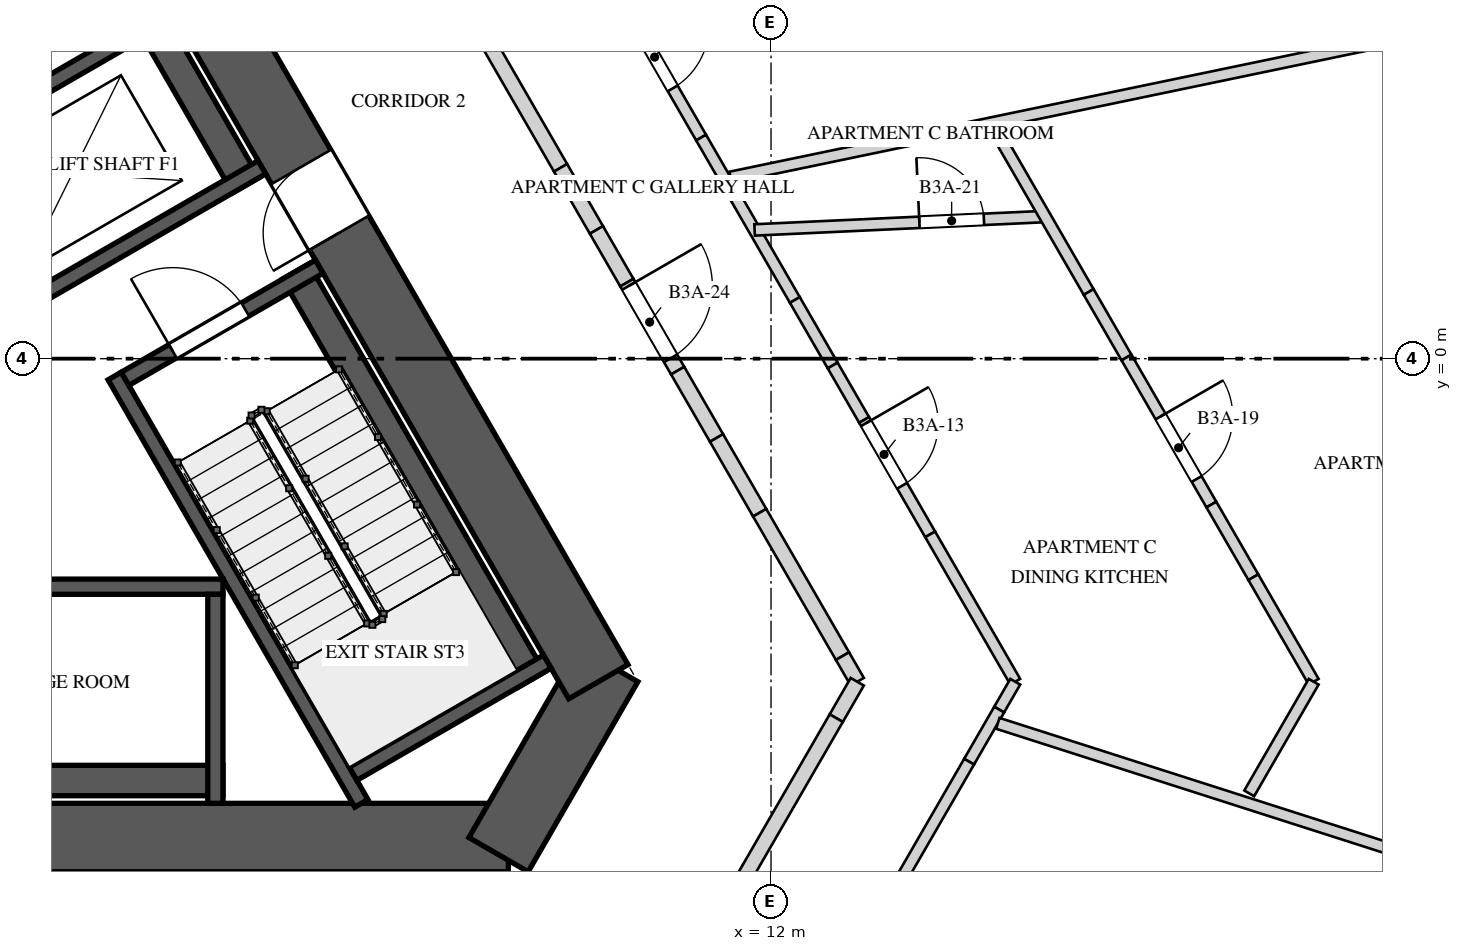
"""IFC4 building model, lengths in metres.
Left out: names, types, materials, properties, quantities, classifications, styles, units other than length and angle.
Written with IfcOpenShell. Run it as: python <this file> out.ifc"""

import sys

from ifc_helpers import new_model, si_unit, direction, frame, frame_2d, origin, place, context, subcontext, project, spatial, polyline, rectangle, outline, extrude, element, fill, save


model = new_model("IFC4")
c1 = context("Model", 3, precision=1e-05, world=origin(), true_north=direction((0.0, 1.0)))
c2 = subcontext(c1, "Body", "Model", "MODEL_VIEW")
j1 = project(units=[si_unit("LENGTHUNIT", "METRE"), si_unit("PLANEANGLEUNIT", "RADIAN")], contexts=[c1])
p1 = place(None, origin())
s1 = spatial("IfcSite", under=j1, at=p1, CompositionType="ELEMENT")
p2 = place(p1, origin())
s2 = spatial("IfcBuilding", under=s1, at=p2, CompositionType="ELEMENT")
p3 = place(p2, frame((0.0, 0.0, 133.6)))
s3 = spatial("IfcBuildingStorey", under=s2, at=p3, CompositionType="ELEMENT", Elevation=133.6)
p4 = place(p3, frame((-8.545, -6.3, 0.0), z_axis=(0.0, 0.0, 1.0), x_axis=(1.0, 0.0, 0.0)))
e1 = element("IfcWall", 1, at=p4, inside=s3, PredefinedType="SHEAR", context=c2, shape_type="SweptSolid", body=[
    extrude(rectangle(XDim=17.09, YDim=0.9, at=frame_2d((8.545, 0.0))), origin(), (0.0, 0.0, 1.0), 4.0),
])
p5 = place(p4, frame((6.75, 0.0, 0.0)))
e2 = element("IfcOpeningElement", 2, at=p5, cuts=e1, PredefinedType="OPENING", context=c2, shape_type="SweptSolid", body=[
    extrude(rectangle(XDim=1.0, YDim=2.4, at=frame_2d((0.5, 1.2))), frame((0.0, 0.46, 0.0), z_axis=(0.0, -1.0, 0.0), x_axis=(1.0, 0.0, 0.0)), (0.0, 0.0, 1.0), 0.92),
])
p6 = place(p3, frame((8.415, -6.525, 0.0), z_axis=(0.0, 0.0, 1.0), x_axis=(0.500059191753, 0.865991226713, 0.0)))
e3 = element("IfcWall", 3, at=p6, inside=s3, PredefinedType="SHEAR", context=c2, shape_type="SweptSolid", body=[
    extrude(rectangle(XDim=2.887, YDim=0.9, at=frame_2d((1.443, 0.0))), origin(), (0.0, 0.0, 1.0), 4.0),
])
p7 = place(p3, frame((9.729, -4.25, 0.0), z_axis=(0.0, 0.0, 1.0), x_axis=(-0.500004814304, 0.866022624227, 0.0)))
e4 = element("IfcWall", 4, at=p7, inside=s3, PredefinedType="SHEAR", context=c2, shape_type="SweptSolid", body=[
    extrude(rectangle(XDim=17.09, YDim=0.9, at=frame_2d((8.545, 0.0))), origin(), (0.0, 0.0, 1.0), 4.0),
])
p8 = place(p7, frame((6.82, 0.0, 0.0)))
e5 = element("IfcOpeningElement", 5, at=p8, cuts=e4, PredefinedType="OPENING", context=c2, shape_type="SweptSolid", body=[
    extrude(rectangle(XDim=1.0, YDim=2.4, at=frame_2d((0.5, 1.2))), frame((0.0, 0.46, 0.0), z_axis=(0.0, -1.0, 0.0), x_axis=(1.0, 0.0, 0.0)), (0.0, 0.0, 1.0), 0.92),
])
p9 = place(p3, frame((8.846, -4.222, 0.0), z_axis=(0.0, 0.0, 1.0), x_axis=(-0.500009909098, 0.866019682689, 0.0)))
e6 = element("IfcWall", 6, at=p9, inside=s3, PredefinedType="SOLIDWALL", context=c2, shape_type="SweptSolid", body=[
    extrude(rectangle(XDim=6.2, YDim=0.4, at=frame_2d((3.1, 0.0))), origin(), (0.0, 0.0, 1.0), 3.65),
])
p10 = place(p3, frame((6.611, -5.85, 0.0), z_axis=(0.0, 0.0, 1.0), x_axis=(-0.499965531574, 0.866045303225, 0.0)))
e7 = element("IfcWall", 7, at=p10, inside=s3, PredefinedType="SOLIDWALL", context=c2, shape_type="SweptSolid", body=[
    extrude(rectangle(XDim=6.492, YDim=0.2, at=frame_2d((3.246, 0.0))), origin(), (0.0, 0.0, 1.0), 3.65),
])
p11 = place(p3, frame((6.501, -5.461, 0.0), z_axis=(0.0, 0.0, 1.0), x_axis=(0.866003658127, 0.500037662692, 0.0)))
e8 = element("IfcWall", 8, at=p11, inside=s3, PredefinedType="SOLIDWALL", context=c2, shape_type="SweptSolid", body=[
    extrude(rectangle(XDim=2.95, YDim=0.2, at=frame_2d((1.475, 0.0))), origin(), (0.0, 0.0, 1.0), 3.65),
])
p12 = place(p3, frame((3.501, -0.265, 0.0), z_axis=(0.0, 0.0, 1.0), x_axis=(0.866039495442, 0.49997559174, 0.0)))
e9 = element("IfcWall", 9, at=p12, inside=s3, PredefinedType="SOLIDWALL", context=c2, shape_type="SweptSolid", body=[
    extrude(rectangle(XDim=2.95, YDim=0.2, at=frame_2d((1.475, 0.0))), origin(), (0.0, 0.0, 1.0), 3.65),
])
p13 = place(p12, frame((0.725, 0.0, 0.0)))
e10 = element("IfcOpeningElement", 10, at=p13, cuts=e9, PredefinedType="OPENING", context=c2, shape_type="SweptSolid", body=[
    extrude(rectangle(XDim=1.1, YDim=2.4, at=frame_2d((0.55, 1.2))), frame((0.0, 0.11, 0.0), z_axis=(0.0, -1.0, 0.0), x_axis=(1.0, 0.0, 0.0)), (0.0, 0.0, 1.0), 0.22),
])
p14 = place(p3, frame((4.79, -3.0, 0.0), z_axis=(0.0, 0.0, 1.0), x_axis=(-1.0, 0.0, 0.0)))
e11 = element("IfcWall", 11, at=p14, inside=s3, PredefinedType="SOLIDWALL", context=c2, shape_type="SweptSolid", body=[
    extrude(rectangle(XDim=5.5, YDim=0.2, at=frame_2d((2.75, 0.0))), origin(), (0.0, 0.0, 1.0), 3.65),
])
p15 = place(p14, frame((2.275, 0.0, 0.0)))
e12 = element("IfcOpeningElement", 12, at=p15, cuts=e11, PredefinedType="OPENING", context=c2, shape_type="SweptSolid", body=[
    extrude(rectangle(XDim=0.95, YDim=2.4, at=frame_2d((0.475, 1.2))), frame((0.0, 0.11, 0.0), z_axis=(0.0, -1.0, 0.0), x_axis=(1.0, 0.0, 0.0)), (0.0, 0.0, 1.0), 0.22),
])
p16 = place(p3, frame((-0.71, -5.55, 0.0), z_axis=(0.0, 0.0, 1.0), x_axis=(1.0, 0.0, 0.0)))
e13 = element("IfcWall", 13, at=p16, inside=s3, PredefinedType="SOLIDWALL", context=c2, shape_type="SweptSolid", body=[
    extrude(rectangle(XDim=5.5, YDim=0.4, at=frame_2d((2.75, 0.0))), origin(), (0.0, 0.0, 1.0), 3.65),
])
p17 = place(p3, frame((4.69, -3.1, 0.0), z_axis=(0.0, 0.0, 1.0), x_axis=(0.0, -1.0, 0.0)))
e14 = element("IfcWall", 14, at=p17, inside=s3, PredefinedType="SOLIDWALL", context=c2, shape_type="SweptSolid", body=[
    extrude(rectangle(XDim=2.75, YDim=0.2, at=frame_2d((1.375, 0.0))), origin(), (0.0, 0.0, 1.0), 3.65),
])
p18 = place(p3, frame((5.092, 2.281, 0.0), z_axis=(0.0, 0.0, 1.0), x_axis=(-0.500018594424, 0.866014668023, 0.0)))
e15 = element("IfcWall", 15, at=p18, inside=s3, PredefinedType="SOLIDWALL", context=c2, shape_type="SweptSolid", body=[
    extrude(rectangle(XDim=4.9, YDim=0.4, at=frame_2d((2.45, 0.0))), origin(), (0.0, 0.0, 1.0), 3.65),
])
for number, where, z_axis, x_axis in (
    (16, (2.227, 0.743, 0.0), (0.0, 0.0, 1.0), (0.866, 0.5, 0.0)),
    (17, (1.052, 2.778, 0.0), (0.0, 0.0, 1.0), (0.866, 0.5, 0.0)),
):
    element("IfcWall", number, at=place(p3, frame(where, z_axis=z_axis, x_axis=x_axis)), inside=s3, PredefinedType="SOLIDWALL", context=c2, shape_type="SweptSolid", body=[
        extrude(rectangle(XDim=3.55, YDim=0.2, at=frame_2d((1.775, 0.0))), origin(), (0.0, 0.0, 1.0), 3.65),
    ])
p19 = place(p3, frame((9.681, 5.331, 0.0), z_axis=(0.0, 0.0, 1.0), x_axis=(0.500034735108, -0.866005348532, 0.0)))
e18 = element("IfcWall", 18, at=p19, inside=s3, PredefinedType="PARTITIONING", context=c2, shape_type="SweptSolid", body=[
    extrude(rectangle(XDim=2.797, YDim=0.15, at=frame_2d((1.398, 0.0))), origin(), (0.0, 0.0, 1.0), 3.65),
])
p20 = place(p19, frame((1.1, 0.0, 0.0)))
e19 = element("IfcOpeningElement", 19, at=p20, cuts=e18, PredefinedType="OPENING", context=c2, shape_type="SweptSolid", body=[
    extrude(rectangle(XDim=0.95, YDim=2.4, at=frame_2d((0.475, 1.2))), frame((0.0, 0.085, 0.0), z_axis=(0.0, -1.0, 0.0), x_axis=(1.0, 0.0, 0.0)), (0.0, 0.0, 1.0), 0.17),
])
p21 = place(p3, frame((11.08, 2.909, 0.0), z_axis=(0.0, 0.0, 1.0), x_axis=(0.500060322201, -0.865990573944, 0.0)))
e20 = element("IfcWall", 20, at=p21, inside=s3, PredefinedType="PARTITIONING", context=c2, shape_type="SweptSolid", body=[
    extrude(rectangle(XDim=0.917, YDim=0.15, at=frame_2d((0.459, 0.0))), origin(), (0.0, 0.0, 1.0), 2.55),
])
p22 = place(p3, frame((11.539, 2.114, 0.0), z_axis=(0.0, 0.0, 1.0), x_axis=(0.499986163319, -0.866033392248, 0.0)))
e21 = element("IfcWall", 21, at=p22, inside=s3, PredefinedType="PARTITIONING", context=c2, shape_type="SweptSolid", body=[
    extrude(rectangle(XDim=1.549, YDim=0.15, at=frame_2d((0.775, 0.0))), origin(), (0.0, 0.0, 1.0), 3.65),
])
p23 = place(p3, frame((12.313, 0.772, 0.0), z_axis=(0.0, 0.0, 1.0), x_axis=(0.499991453095, -0.866030338286, 0.0)))
e22 = element("IfcWall", 22, at=p23, inside=s3, PredefinedType="PARTITIONING", context=c2, shape_type="SweptSolid", body=[
    extrude(rectangle(XDim=0.995, YDim=0.15, at=frame_2d((0.498, 0.0))), origin(), (0.0, 0.0, 1.0), 2.55),
])
p24 = place(p3, frame((12.811, -0.089, 0.0), z_axis=(0.0, 0.0, 1.0), x_axis=(0.500012022864, -0.866018462269, 0.0)))
e23 = element("IfcWall", 23, at=p24, inside=s3, PredefinedType="PARTITIONING", context=c2, shape_type="SweptSolid", body=[
    extrude(rectangle(XDim=0.827, YDim=0.15, at=frame_2d((0.414, 0.0))), origin(), (0.0, 0.0, 1.0), 3.65),
])
p25 = place(p3, frame((13.225, -0.806, 0.0), z_axis=(0.0, 0.0, 1.0), x_axis=(0.500006134913, -0.866021861762, 0.0)))
e24 = element("IfcWall", 24, at=p25, inside=s3, PredefinedType="PARTITIONING", context=c2, shape_type="SweptSolid", body=[
    extrude(outline(polyline([(0.0, 0.0), (1.738, 0.0), (1.738, 2.55), (0.635, 2.55), (0.635, 3.65), (0.0, 3.65), (0.0, 0.0)])), frame((0.0, 0.075, 0.0), z_axis=(0.0, -1.0, 0.0), x_axis=(1.0, 0.0, 0.0)), (0.0, 0.0, 1.0), 0.15),
])
p26 = place(p25, frame((0.05, 0.0, 0.0)))
e25 = element("IfcOpeningElement", 25, at=p26, cuts=e24, PredefinedType="OPENING", context=c2, shape_type="SweptSolid", body=[
    extrude(rectangle(XDim=0.95, YDim=2.4, at=frame_2d((0.475, 1.2))), frame((0.0, 0.085, 0.0), z_axis=(0.0, -1.0, 0.0), x_axis=(1.0, 0.0, 0.0)), (0.0, 0.0, 1.0), 0.17),
])
p27 = place(p3, frame((14.094, -2.311, 0.0), z_axis=(0.0, 0.0, 1.0), x_axis=(0.499974169222, -0.866040316677, 0.0)))
e26 = element("IfcWall", 26, at=p27, inside=s3, PredefinedType="PARTITIONING", context=c2, shape_type="SweptSolid", body=[
    extrude(rectangle(XDim=2.239, YDim=0.15, at=frame_2d((1.119, 0.0))), origin(), (0.0, 0.0, 1.0), 3.65),
])
p28 = place(p3, frame((11.468, 2.386, 0.0), z_axis=(0.0, 0.0, 1.0), x_axis=(0.979030724859, 0.203712640211, 0.0)))
e27 = element("IfcWall", 27, at=p28, inside=s3, PredefinedType="PARTITIONING", context=c2, shape_type="SweptSolid", body=[
    extrude(rectangle(XDim=11.864, YDim=0.15, at=frame_2d((5.932, 0.0))), origin(), (0.0, 0.0, 1.0), 2.55),
])
p29 = place(p3, frame((11.784, 1.694, 0.0), z_axis=(0.0, 0.0, 1.0), x_axis=(0.998933757579, 0.046166524337, 0.0)))
e28 = element("IfcWall", 28, at=p29, inside=s3, PredefinedType="PARTITIONING", context=c2, shape_type="SweptSolid", body=[
    extrude(rectangle(XDim=3.823, YDim=0.15, at=frame_2d((1.912, 0.0))), origin(), (0.0, 0.0, 1.0), 3.65),
])
p30 = place(p29, frame((2.17, 0.0, 0.0)))
e29 = element("IfcOpeningElement", 29, at=p30, cuts=e28, PredefinedType="OPENING", context=c2, shape_type="SweptSolid", body=[
    extrude(rectangle(XDim=0.85, YDim=2.4, at=frame_2d((0.425, 1.2))), frame((0.0, 0.085, 0.0), z_axis=(0.0, -1.0, 0.0), x_axis=(1.0, 0.0, 0.0)), (0.0, 0.0, 1.0), 0.17),
])
p31 = place(p3, frame((14.936, 3.031, 0.0), z_axis=(0.0, 0.0, 1.0), x_axis=(0.499298623879, -0.866429964967, 0.0)))
e30 = element("IfcWall", 30, at=p31, inside=s3, PredefinedType="PARTITIONING", context=c2, shape_type="SweptSolid", body=[
    extrude(rectangle(XDim=0.166, YDim=0.15, at=frame_2d((0.083, 0.0))), origin(), (0.0, 0.0, 1.0), 2.55),
])
p32 = place(p3, frame((15.019, 2.887, 0.0), z_axis=(0.0, 0.0, 1.0), x_axis=(0.50006548692, -0.865987591592, 0.0)))
e31 = element("IfcWall", 31, at=p32, inside=s3, PredefinedType="PARTITIONING", context=c2, shape_type="SweptSolid", body=[
    extrude(rectangle(XDim=2.321, YDim=0.15, at=frame_2d((1.16, 0.0))), origin(), (0.0, 0.0, 1.0), 3.65),
])
p33 = place(p3, frame((16.179, 0.877, 0.0), z_axis=(0.0, 0.0, 1.0), x_axis=(0.499991453095, -0.866030338286, 0.0)))
e32 = element("IfcWall", 32, at=p33, inside=s3, PredefinedType="PARTITIONING", context=c2, shape_type="SweptSolid", body=[
    extrude(rectangle(XDim=0.995, YDim=0.15, at=frame_2d((0.498, 0.0))), origin(), (0.0, 0.0, 1.0), 2.55),
])
p34 = place(p3, frame((16.677, 0.016, 0.0), z_axis=(0.0, 0.0, 1.0), x_axis=(0.499958946799, -0.866049104564, 0.0)))
e33 = element("IfcWall", 33, at=p34, inside=s3, PredefinedType="PARTITIONING", context=c2, shape_type="SweptSolid", body=[
    extrude(rectangle(XDim=2.234, YDim=0.15, at=frame_2d((1.117, 0.0))), origin(), (0.0, 0.0, 1.0), 3.65),
])
p35 = place(p34, frame((0.896, 0.0, 0.0)))
e34 = element("IfcOpeningElement", 34, at=p35, cuts=e33, PredefinedType="OPENING", context=c2, shape_type="SweptSolid", body=[
    extrude(rectangle(XDim=0.95, YDim=2.4, at=frame_2d((0.475, 1.2))), frame((0.0, 0.085, 0.0), z_axis=(0.0, -1.0, 0.0), x_axis=(1.0, 0.0, 0.0)), (0.0, 0.0, 1.0), 0.17),
])
p36 = place(p3, frame((17.793, -1.919, 0.0), z_axis=(0.0, 0.0, 1.0), x_axis=(0.500111757231, -0.865960871102, 0.0)))
e35 = element("IfcWall", 35, at=p36, inside=s3, PredefinedType="PARTITIONING", context=c2, shape_type="SweptSolid", body=[
    extrude(rectangle(XDim=1.104, YDim=0.15, at=frame_2d((0.552, 0.0))), origin(), (0.0, 0.0, 1.0), 2.55),
])
p37 = place(p3, frame((18.345, -2.875, 0.0), z_axis=(0.0, 0.0, 1.0), x_axis=(0.499926564348, -0.866067797727, 0.0)))
e36 = element("IfcWall", 36, at=p37, inside=s3, PredefinedType="PARTITIONING", context=c2, shape_type="SweptSolid", body=[
    extrude(rectangle(XDim=1.588, YDim=0.15, at=frame_2d((0.794, 0.0))), origin(), (0.0, 0.0, 1.0), 3.65),
])
p38 = place(p3, frame((15.213, -4.25, 0.0), z_axis=(0.0, 0.0, 1.0), x_axis=(-0.499922110319, -0.866070368743, 0.0)))
e37 = element("IfcWall", 37, at=p38, inside=s3, PredefinedType="PARTITIONING", context=c2, shape_type="SweptSolid", body=[
    extrude(rectangle(XDim=0.423, YDim=0.15, at=frame_2d((0.212, 0.0))), origin(), (0.0, 0.0, 1.0), 3.65),
])
p39 = place(p3, frame((15.001, -4.617, 0.0), z_axis=(0.0, 0.0, 1.0), x_axis=(-0.49989173393, -0.866087902207, 0.0)))
e38 = element("IfcWall", 38, at=p39, inside=s3, PredefinedType="PARTITIONING", context=c2, shape_type="SweptSolid", body=[
    extrude(rectangle(XDim=0.791, YDim=0.15, at=frame_2d((0.396, 0.0))), origin(), (0.0, 0.0, 1.0), 2.75),
])
p40 = place(p3, frame((14.606, -5.302, 0.0), z_axis=(0.0, 0.0, 1.0), x_axis=(-0.50004374799, -0.866000144397, 0.0)))
e39 = element("IfcWall", 39, at=p40, inside=s3, PredefinedType="PARTITIONING", context=c2, shape_type="SweptSolid", body=[
    extrude(rectangle(XDim=4.209, YDim=0.15, at=frame_2d((2.105, 0.0))), origin(), (0.0, 0.0, 1.0), 3.65),
])
p41 = place(p40, frame((2.518, 0.0, 0.0)))
e40 = element("IfcOpeningElement", 40, at=p41, cuts=e39, PredefinedType="OPENING", context=c2, shape_type="SweptSolid", body=[
    extrude(rectangle(XDim=0.95, YDim=2.4, at=frame_2d((0.475, 1.2))), frame((0.0, 0.085, 0.0), z_axis=(0.0, -1.0, 0.0), x_axis=(1.0, 0.0, 0.0)), (0.0, 0.0, 1.0), 0.17),
])
p42 = place(p3, frame((19.139, -4.25, 0.0), z_axis=(0.0, 0.0, 1.0), x_axis=(-0.49996337474, -0.866046548355, 0.0)))
e41 = element("IfcWall", 41, at=p42, inside=s3, PredefinedType="PARTITIONING", context=c2, shape_type="SweptSolid", body=[
    extrude(rectangle(XDim=1.696, YDim=0.15, at=frame_2d((0.848, 0.0))), origin(), (0.0, 0.0, 1.0), 3.65),
])
p43 = place(p3, frame((22.454, -7.189, 0.0), z_axis=(0.0, 0.0, 1.0), x_axis=(-0.952376070942, 0.304925924606, 0.0)))
e42 = element("IfcWall", 42, at=p43, inside=s3, PredefinedType="PARTITIONING", context=c2, shape_type="SweptSolid", body=[
    extrude(rectangle(XDim=7.844, YDim=0.15, at=frame_2d((3.922, 0.0))), origin(), (0.0, 0.0, 1.0), 2.75),
])
p44 = place(p3, frame((8.142, 4.397, 0.0), z_axis=(0.0, 0.0, 1.0), x_axis=(0.499948868167, -0.866054922749, 0.0)))
e43 = element("IfcWall", 43, at=p44, inside=s3, PredefinedType="SOLIDWALL", context=c2, shape_type="SweptSolid", body=[
    extrude(rectangle(XDim=2.178, YDim=0.2, at=frame_2d((1.089, 0.0))), origin(), (0.0, 0.0, 1.0), 3.65),
])
p45 = place(p3, frame((9.231, 2.511, 0.0), z_axis=(0.0, 0.0, 1.0), x_axis=(0.500118100521, -0.865957207679, 0.0)))
e44 = element("IfcWall", 44, at=p45, inside=s3, PredefinedType="SOLIDWALL", context=c2, shape_type="SweptSolid", body=[
    extrude(rectangle(XDim=0.944, YDim=0.2, at=frame_2d((0.472, 0.0))), origin(), (0.0, 0.0, 1.0), 2.55),
])
p46 = place(p3, frame((9.703, 1.694, 0.0), z_axis=(0.0, 0.0, 1.0), x_axis=(0.499942357345, -0.866058681229, 0.0)))
e45 = element("IfcWall", 45, at=p46, inside=s3, PredefinedType="SOLIDWALL", context=c2, shape_type="SweptSolid", body=[
    extrude(rectangle(XDim=0.801, YDim=0.2, at=frame_2d((0.4, 0.0))), origin(), (0.0, 0.0, 1.0), 3.65),
])
p47 = place(p3, frame((10.104, 1.0, 0.0), z_axis=(0.0, 0.0, 1.0), x_axis=(0.499891098986, -0.866088268685, 0.0)))
e46 = element("IfcWall", 46, at=p47, inside=s3, PredefinedType="SOLIDWALL", context=c2, shape_type="SweptSolid", body=[
    extrude(outline(polyline([(0.0, 0.0), (1.337, 0.0), (1.337, 2.55), (0.313, 2.55), (0.313, 3.65), (0.0, 3.65), (0.0, 0.0)])), frame((0.0, 0.1, 0.0), z_axis=(0.0, -1.0, 0.0), x_axis=(1.0, 0.0, 0.0)), (0.0, 0.0, 1.0), 0.2),
])
p48 = place(p47, frame((0.05, 0.0, 0.0)))
e47 = element("IfcOpeningElement", 47, at=p48, cuts=e46, PredefinedType="OPENING", context=c2, shape_type="SweptSolid", body=[
    extrude(rectangle(XDim=1.1, YDim=2.4, at=frame_2d((0.55, 1.2))), frame((0.0, 0.11, 0.0), z_axis=(0.0, -1.0, 0.0), x_axis=(1.0, 0.0, 0.0)), (0.0, 0.0, 1.0), 0.22),
])
p49 = place(p3, frame((10.772, -0.157, 0.0), z_axis=(0.0, 0.0, 1.0), x_axis=(0.500170198676, -0.865927117231, 0.0)))
e48 = element("IfcWall", 48, at=p49, inside=s3, PredefinedType="SOLIDWALL", context=c2, shape_type="SweptSolid", body=[
    extrude(rectangle(XDim=1.023, YDim=0.2, at=frame_2d((0.511, 0.0))), origin(), (0.0, 0.0, 1.0), 3.65),
])
p50 = place(p3, frame((11.283, -1.043, 0.0), z_axis=(0.0, 0.0, 1.0), x_axis=(0.500001688065, -0.866024429177, 0.0)))
e49 = element("IfcWall", 49, at=p50, inside=s3, PredefinedType="SOLIDWALL", context=c2, shape_type="SweptSolid", body=[
    extrude(rectangle(XDim=1.135, YDim=0.2, at=frame_2d((0.568, 0.0))), origin(), (0.0, 0.0, 1.0), 2.55),
])
p51 = place(p3, frame((11.851, -2.026, 0.0), z_axis=(0.0, 0.0, 1.0), x_axis=(0.50001992892, -0.866013897511, 0.0)))
e50 = element("IfcWall", 50, at=p51, inside=s3, PredefinedType="SOLIDWALL", context=c2, shape_type="SweptSolid", body=[
    extrude(rectangle(XDim=2.179, YDim=0.2, at=frame_2d((1.089, 0.0))), origin(), (0.0, 0.0, 1.0), 3.65),
])
p52 = place(p3, frame((12.94, -3.913, 0.0), z_axis=(0.0, 0.0, 1.0), x_axis=(0.499849133735, -0.866112488944, 0.0)))
e51 = element("IfcWall", 51, at=p52, inside=s3, PredefinedType="SOLIDWALL", context=c2, shape_type="SweptSolid", body=[
    extrude(rectangle(XDim=0.389, YDim=0.2, at=frame_2d((0.195, 0.0))), origin(), (0.0, 0.0, 1.0), 2.75),
])
p53 = place(p3, frame((13.135, -4.25, 0.0), z_axis=(0.0, 0.0, 1.0), x_axis=(-0.499887958344, -0.866090081402, 0.0)))
e52 = element("IfcWall", 52, at=p53, inside=s3, PredefinedType="SOLIDWALL", context=c2, shape_type="SweptSolid", body=[
    extrude(rectangle(XDim=0.553, YDim=0.2, at=frame_2d((0.277, 0.0))), origin(), (0.0, 0.0, 1.0), 2.75),
])
p54 = place(p3, frame((12.858, -4.729, 0.0), z_axis=(0.0, 0.0, 1.0), x_axis=(-0.500031425827, -0.866007259314, 0.0)))
e53 = element("IfcWall", 53, at=p54, inside=s3, PredefinedType="SOLIDWALL", context=c2, shape_type="SweptSolid", body=[
    extrude(rectangle(XDim=3.602, YDim=0.2, at=frame_2d((1.801, 0.0))), origin(), (0.0, 0.0, 1.0), 3.65),
])
p55 = place(p13, origin())
e54 = element("IfcDoor", 54, at=p55, inside=s3, OperationType="SINGLE_SWING_RIGHT", PredefinedType="DOOR", context=c2, shape_type="SweptSolid", body=[
    extrude(rectangle(XDim=1.1, YDim=2.4, at=frame_2d((0.55, 1.2))), frame((0.0, 0.025, 0.0), z_axis=(0.0, -1.0, 0.0), x_axis=(1.0, 0.0, 0.0)), (0.0, 0.0, 1.0), 0.05),
])
fill(e10, e54)
p56 = place(p8, origin())
e55 = element("IfcDoor", 55, at=p56, inside=s3, OperationType="SINGLE_SWING_LEFT", PredefinedType="DOOR", context=c2, shape_type="SweptSolid", body=[
    extrude(rectangle(XDim=1.0, YDim=2.4, at=frame_2d((0.5, 1.2))), frame((0.0, 0.025, 0.0), z_axis=(0.0, -1.0, 0.0), x_axis=(1.0, 0.0, 0.0)), (0.0, 0.0, 1.0), 0.05),
])
fill(e5, e55)
p57 = place(p26, origin())
e56 = element("IfcDoor", 56, at=p57, inside=s3, OperationType="SINGLE_SWING_LEFT", PredefinedType="DOOR", context=c2, shape_type="SweptSolid", body=[
    extrude(rectangle(XDim=0.95, YDim=2.4, at=frame_2d((0.475, 1.2))), frame((0.0, 0.025, 0.0), z_axis=(0.0, -1.0, 0.0), x_axis=(1.0, 0.0, 0.0)), (0.0, 0.0, 1.0), 0.05),
])
fill(e25, e56)
p58 = place(p20, origin())
e57 = element("IfcDoor", 57, at=p58, inside=s3, OperationType="SINGLE_SWING_LEFT", PredefinedType="DOOR", context=c2, shape_type="SweptSolid", body=[
    extrude(rectangle(XDim=0.95, YDim=2.4, at=frame_2d((0.475, 1.2))), frame((0.0, 0.025, 0.0), z_axis=(0.0, -1.0, 0.0), x_axis=(1.0, 0.0, 0.0)), (0.0, 0.0, 1.0), 0.05),
])
fill(e19, e57)
p59 = place(p35, origin())
e58 = element("IfcDoor", 58, at=p59, inside=s3, OperationType="SINGLE_SWING_LEFT", PredefinedType="DOOR", context=c2, shape_type="SweptSolid", body=[
    extrude(rectangle(XDim=0.95, YDim=2.4, at=frame_2d((0.475, 1.2))), frame((0.0, 0.025, 0.0), z_axis=(0.0, -1.0, 0.0), x_axis=(1.0, 0.0, 0.0)), (0.0, 0.0, 1.0), 0.05),
])
fill(e34, e58)
p60 = place(p30, origin())
e59 = element("IfcDoor", 59, at=p60, inside=s3, OperationType="SINGLE_SWING_LEFT", PredefinedType="DOOR", context=c2, shape_type="SweptSolid", body=[
    extrude(rectangle(XDim=0.85, YDim=2.4, at=frame_2d((0.425, 1.2))), frame((0.0, 0.025, 0.0), z_axis=(0.0, -1.0, 0.0), x_axis=(1.0, 0.0, 0.0)), (0.0, 0.0, 1.0), 0.05),
])
fill(e29, e59)
p61 = place(p48, origin())
e60 = element("IfcDoor", 60, at=p61, inside=s3, OperationType="SINGLE_SWING_RIGHT", PredefinedType="DOOR", context=c2, shape_type="SweptSolid", body=[
    extrude(rectangle(XDim=1.1, YDim=2.4, at=frame_2d((0.55, 1.2))), frame((0.0, 0.025, 0.0), z_axis=(0.0, -1.0, 0.0), x_axis=(1.0, 0.0, 0.0)), (0.0, 0.0, 1.0), 0.05),
])
fill(e47, e60)
save(model, sys.argv[1])
